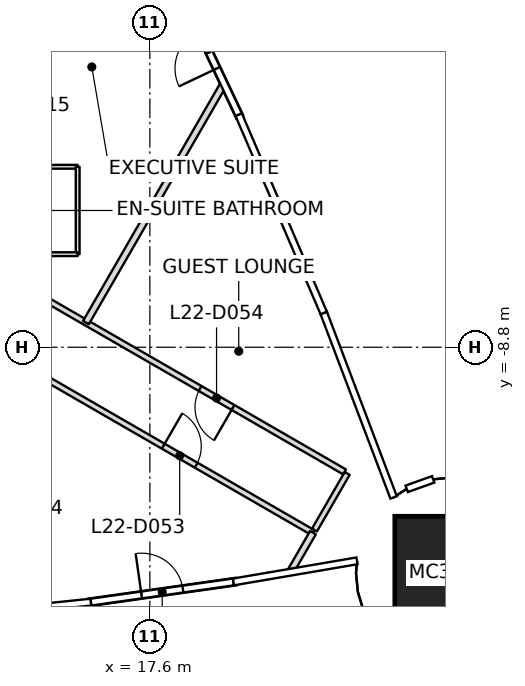
"""IFC4 building model, lengths in metres.
Left out: names, types, materials, properties, quantities, classifications, styles, units other than length and angle.
Written with IfcOpenShell. Run it as: python <this file> out.ifc"""

import sys

from ifc_helpers import new_model, si_unit, direction, frame, frame_2d, origin, origin_2d, place, context, subcontext, project, spatial, rectangle, extrude, clip, halfspace, element, fill, save


model = new_model("IFC4")
c1 = context("Model", 3, precision=1e-05, world=origin(), true_north=direction((0.0, 1.0)))
c2 = subcontext(c1, "Body", "Model", "MODEL_VIEW")
j1 = project(units=[si_unit("LENGTHUNIT", "METRE"), si_unit("PLANEANGLEUNIT", "RADIAN")], contexts=[c1])
p1 = place(None, origin())
s1 = spatial("IfcSite", under=j1, at=p1, CompositionType="ELEMENT")
p2 = place(p1, origin())
s2 = spatial("IfcBuilding", under=s1, at=p2, CompositionType="ELEMENT")
p3 = place(p2, frame((0.0, 0.0, 103.5)))
s3 = spatial("IfcBuildingStorey", under=s2, at=p3, CompositionType="ELEMENT", Elevation=103.5)
p4 = place(p3, frame((25.546, -14.749, 0.0), z_axis=(-0.030400226529, 0.017607072632, 0.999382718092), x_axis=(0.999537806302, 0.000535506504, 0.030395509632)))
e1 = element("IfcColumn", 1, at=p4, inside=s3, PredefinedType="COLUMN", context=c2, shape_type="SweptSolid", body=[
    clip(extrude(rectangle(XDim=3.0, YDim=3.0, at=origin_2d()), origin(), (0.0, 0.0, 1.0), 3.702), halfspace(frame((0.0, 0.0, 3.691)), False)),
])
p5 = place(p3, frame((15.961, -15.52, 0.0), z_axis=(0.0, 0.0, 1.0), x_axis=(0.990119893165, 0.140223383067, 0.0)))
e2 = element("IfcWall", 2, at=p5, inside=s3, PredefinedType="SOLIDWALL", context=c2, shape_type="SweptSolid", body=[
    extrude(rectangle(XDim=3.966, YDim=0.2, at=frame_2d((1.983, 0.0))), origin(), (0.0, 0.0, 1.0), 3.04),
])
p6 = place(p5, frame((1.433, 0.0, 0.0)))
e3 = element("IfcOpeningElement", 3, at=p6, cuts=e2, PredefinedType="OPENING", context=c2, shape_type="SweptSolid", body=[
    extrude(rectangle(XDim=1.1, YDim=2.1, at=frame_2d((0.55, 1.05))), frame((0.0, 0.1, 0.0), z_axis=(0.0, -1.0, 0.0), x_axis=(1.0, 0.0, 0.0)), (0.0, 0.0, 1.0), 0.2),
])
p7 = place(p3, frame((19.975, -2.759, 0.0), z_axis=(0.0, 0.0, 1.0), x_axis=(-0.427856133111, 0.903846850611, 0.0)))
e4 = element("IfcWall", 4, at=p7, inside=s3, PredefinedType="SOLIDWALL", context=c2, shape_type="SweptSolid", body=[
    extrude(rectangle(XDim=3.966, YDim=0.2, at=frame_2d((1.983, 0.0))), origin(), (0.0, 0.0, 1.0), 2.947),
])
p8 = place(p7, frame((1.433, 0.0, 0.0)))
e5 = element("IfcOpeningElement", 5, at=p8, cuts=e4, PredefinedType="OPENING", context=c2, shape_type="SweptSolid", body=[
    extrude(rectangle(XDim=1.1, YDim=2.1, at=frame_2d((0.55, 1.05))), frame((0.0, 0.1, 0.0), z_axis=(0.0, -1.0, 0.0), x_axis=(1.0, 0.0, 0.0)), (0.0, 0.0, 1.0), 0.2),
])
p9 = place(p3, frame((19.554, -1.853, 0.0), z_axis=(0.0, 0.0, 1.0), x_axis=(-0.500006290091, -0.866021772168, 0.0)))
e6 = element("IfcWall", 6, at=p9, inside=s3, PredefinedType="PARTITIONING", context=c2, shape_type="SweptSolid", body=[
    extrude(rectangle(XDim=7.272, YDim=0.175, at=frame_2d((3.636, 0.0))), origin(), (0.0, 0.0, 1.0), 2.947),
])
p10 = place(p3, frame((21.892, -13.679, 0.0), z_axis=(0.0, 0.0, 1.0), x_axis=(-0.499896243657, -0.866085299251, 0.0)))
e7 = element("IfcWall", 7, at=p10, inside=s3, PredefinedType="PARTITIONING", context=c2, shape_type="SweptSolid", body=[
    extrude(rectangle(XDim=1.216, YDim=0.175, at=frame_2d((0.608, 0.0))), origin(), (0.0, 0.0, 1.0), 3.15),
])
p11 = place(p3, frame((12.879, -8.475, 0.0), z_axis=(0.0, 0.0, 1.0), x_axis=(0.866019944116, -0.500009456303, 0.0)))
e8 = element("IfcWall", 8, at=p11, inside=s3, PredefinedType="PARTITIONING", context=c2, shape_type="SweptSolid", body=[
    extrude(rectangle(XDim=10.407, YDim=0.15, at=frame_2d((5.204, 0.0))), origin(), (0.0, 0.0, 1.0), 2.797),
])
p12 = place(p11, frame((5.858, 0.0, 0.0)))
e9 = element("IfcOpeningElement", 9, at=p12, cuts=e8, PredefinedType="OPENING", context=c2, shape_type="SweptSolid", body=[
    extrude(rectangle(XDim=1.0, YDim=2.1, at=frame_2d((0.5, 1.05))), frame((0.0, 0.075, 0.0), z_axis=(0.0, -1.0, 0.0), x_axis=(1.0, 0.0, 0.0)), (0.0, 0.0, 1.0), 0.15),
])
p13 = place(p3, frame((21.932, -13.609, 0.0), z_axis=(0.0, 0.0, 1.0), x_axis=(0.500062383118, 0.865989383878, 0.0)))
e10 = element("IfcWall", 10, at=p13, inside=s3, PredefinedType="PARTITIONING", context=c2, shape_type="SweptSolid", body=[
    extrude(rectangle(XDim=1.72, YDim=0.15, at=frame_2d((0.86, 0.0))), origin(), (0.0, 0.0, 1.0), 2.797),
])
p14 = place(p3, frame((22.723, -12.08, 0.0), z_axis=(0.0, 0.0, 1.0), x_axis=(-0.866023783073, 0.500002807145, 0.0)))
e11 = element("IfcWall", 11, at=p14, inside=s3, PredefinedType="PARTITIONING", context=c2, shape_type="SweptSolid", body=[
    extrude(rectangle(XDim=11.458, YDim=0.15, at=frame_2d((5.729, 0.0))), origin(), (0.0, 0.0, 1.0), 2.947),
])
p15 = place(p14, frame((3.389, 0.0, 0.0)))
e12 = element("IfcOpeningElement", 12, at=p15, cuts=e11, PredefinedType="OPENING", context=c2, shape_type="SweptSolid", body=[
    extrude(rectangle(XDim=1.0, YDim=2.1, at=frame_2d((0.5, 1.05))), frame((0.0, 0.075, 0.0), z_axis=(0.0, -1.0, 0.0), x_axis=(1.0, 0.0, 0.0)), (0.0, 0.0, 1.0), 0.15),
])
p16 = place(p3, frame((12.83, -4.051, 0.0), z_axis=(0.0, 0.0, 1.0), x_axis=(1.0, 0.0, 0.0)))
e13 = element("IfcWall", 13, at=p16, inside=s3, PredefinedType="PARTITIONING", context=c2, shape_type="SweptSolid", body=[
    extrude(rectangle(XDim=2.87, YDim=0.1, at=frame_2d((1.435, 0.0))), origin(), (0.0, 0.0, 1.0), 2.947),
])
p17 = place(p16, frame((1.035, 0.0, 0.0)))
e14 = element("IfcOpeningElement", 14, at=p17, cuts=e13, PredefinedType="OPENING", context=c2, shape_type="SweptSolid", body=[
    extrude(rectangle(XDim=0.8, YDim=2.1, at=frame_2d((0.4, 1.05))), frame((0.0, 0.05, 0.0), z_axis=(0.0, -1.0, 0.0), x_axis=(1.0, 0.0, 0.0)), (0.0, 0.0, 1.0), 0.1),
])
p18 = place(p3, frame((15.7, -4.051, 0.0), z_axis=(0.0, 0.0, 1.0), x_axis=(0.0, -1.0, 0.0)))
e15 = element("IfcWall", 15, at=p18, inside=s3, PredefinedType="PARTITIONING", context=c2, shape_type="SweptSolid", body=[
    extrude(rectangle(XDim=2.3, YDim=0.1, at=frame_2d((1.15, 0.0))), origin(), (0.0, 0.0, 1.0), 3.15),
])
p19 = place(p3, frame((15.7, -6.351, 0.0), z_axis=(0.0, 0.0, 1.0), x_axis=(-1.0, 0.0, 0.0)))
e16 = element("IfcWall", 16, at=p19, inside=s3, PredefinedType="PARTITIONING", context=c2, shape_type="SweptSolid", body=[
    extrude(rectangle(XDim=2.84, YDim=0.1, at=frame_2d((1.42, 0.0))), origin(), (0.0, 0.0, 1.0), 3.15),
])
p20 = place(p6, origin())
e17 = element("IfcDoor", 17, at=p20, inside=s3, OperationType="SINGLE_SWING_RIGHT", PredefinedType="DOOR", context=c2, shape_type="SweptSolid", body=[
    extrude(rectangle(XDim=1.1, YDim=2.1, at=frame_2d((0.55, 1.05))), frame((0.0, 0.025, 0.0), z_axis=(0.0, -1.0, 0.0), x_axis=(1.0, 0.0, 0.0)), (0.0, 0.0, 1.0), 0.05),
])
fill(e3, e17)
p21 = place(p8, origin())
e18 = element("IfcDoor", 18, at=p21, inside=s3, OperationType="SINGLE_SWING_LEFT", PredefinedType="DOOR", context=c2, shape_type="SweptSolid", body=[
    extrude(rectangle(XDim=1.1, YDim=2.1, at=frame_2d((0.55, 1.05))), frame((0.0, 0.025, 0.0), z_axis=(0.0, -1.0, 0.0), x_axis=(1.0, 0.0, 0.0)), (0.0, 0.0, 1.0), 0.05),
])
fill(e5, e18)
p22 = place(p12, origin())
e19 = element("IfcDoor", 19, at=p22, inside=s3, OperationType="SINGLE_SWING_LEFT", PredefinedType="DOOR", context=c2, shape_type="SweptSolid", body=[
    extrude(rectangle(XDim=1.0, YDim=2.1, at=frame_2d((0.5, 1.05))), frame((0.0, 0.025, 0.0), z_axis=(0.0, -1.0, 0.0), x_axis=(1.0, 0.0, 0.0)), (0.0, 0.0, 1.0), 0.05),
])
fill(e9, e19)
p23 = place(p15, origin())
e20 = element("IfcDoor", 20, at=p23, inside=s3, OperationType="SINGLE_SWING_LEFT", PredefinedType="DOOR", context=c2, shape_type="SweptSolid", body=[
    extrude(rectangle(XDim=1.0, YDim=2.1, at=frame_2d((0.5, 1.05))), frame((0.0, 0.025, 0.0), z_axis=(0.0, -1.0, 0.0), x_axis=(1.0, 0.0, 0.0)), (0.0, 0.0, 1.0), 0.05),
])
fill(e12, e20)
save(model, sys.argv[1])
